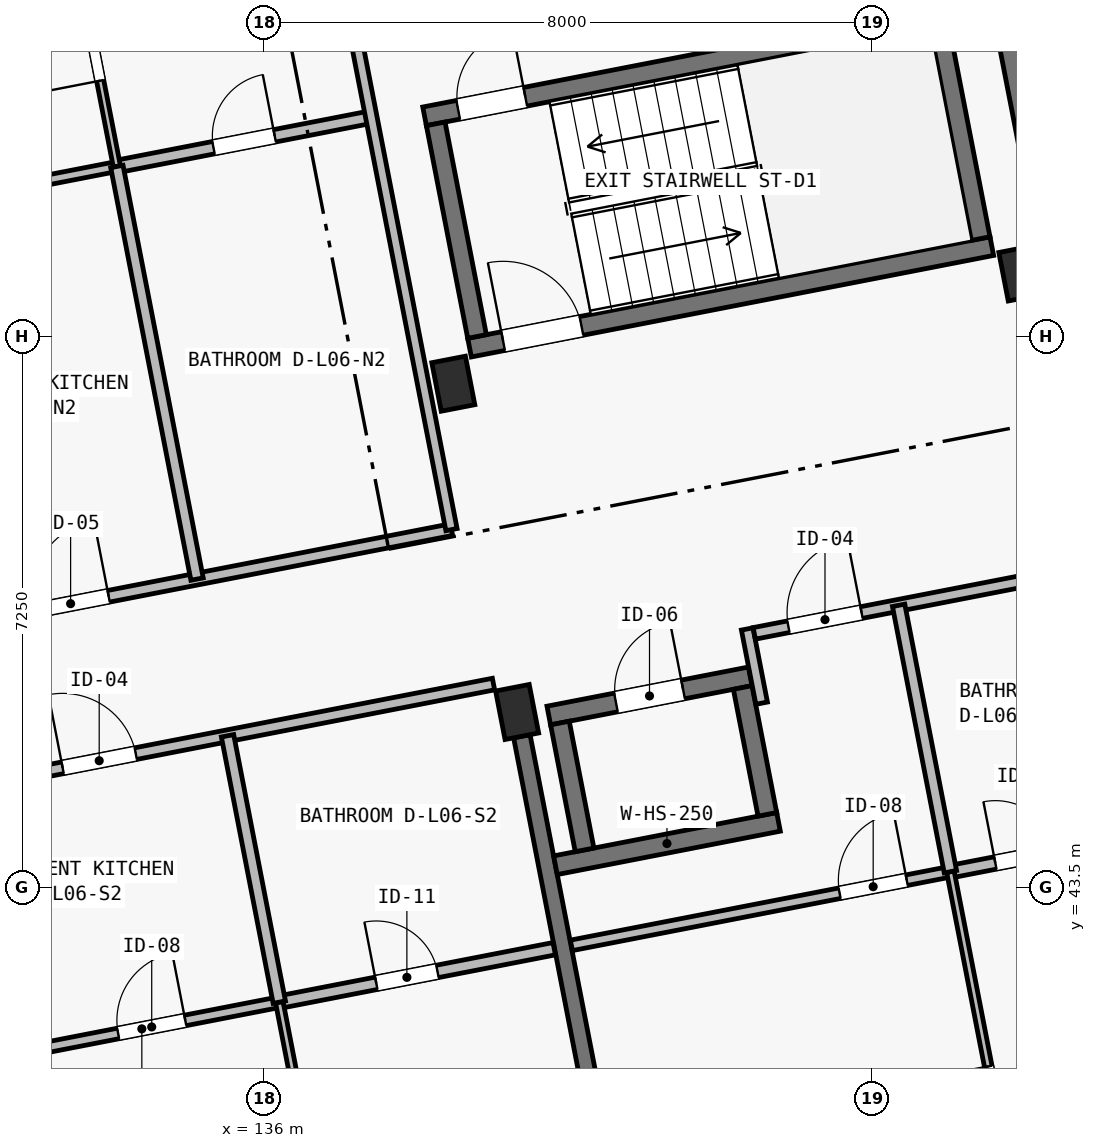
"""IFC4 building model, lengths in metres.
Left out: names, types, materials, properties, quantities, classifications, styles, units other than length and angle.
Written with IfcOpenShell. Run it as: python <this file> out.ifc"""

import sys

from ifc_helpers import new_model, si_unit, direction, frame, frame_2d, origin, origin_2d, place, context, subcontext, project, spatial, rectangle, extrude, element, fill, save


model = new_model("IFC4")
c1 = context("Model", 3, precision=1e-05, world=origin(), true_north=direction((0.0, 1.0)))
c2 = subcontext(c1, "Body", "Model", "MODEL_VIEW")
j1 = project(units=[si_unit("LENGTHUNIT", "METRE"), si_unit("PLANEANGLEUNIT", "RADIAN")], contexts=[c1])
p1 = place(None, origin())
s1 = spatial("IfcSite", under=j1, at=p1, CompositionType="ELEMENT")
p2 = place(p1, origin())
s2 = spatial("IfcBuilding", under=s1, at=p2, CompositionType="ELEMENT")
p3 = place(p2, frame((0.0, 0.0, 21.4)))
s3 = spatial("IfcBuildingStorey", under=s2, at=p3, CompositionType="ELEMENT", Elevation=21.4)
for number, where, z_axis, x_axis in (
    (1, (139.331, 45.811, 0.0), (0.0, 0.0, 1.0), (0.982, 0.191, 0.0)),
    (2, (138.491, 50.13, 0.0), (0.0, 0.0, 1.0), (0.982, 0.191, 0.0)),
    (3, (145.952, 51.58, 0.0), (0.0, 0.0, 1.0), (0.982, 0.191, 0.0)),
):
    element("IfcColumn", number, at=place(p3, frame(where, z_axis=z_axis, x_axis=x_axis)), inside=s3, PredefinedType="COLUMN", context=c2, shape_type="SweptSolid", body=[
        extrude(rectangle(XDim=0.45, YDim=0.65, at=origin_2d()), origin(), (0.0, 0.0, 1.0), 3.25),
    ])
p4 = place(p3, frame((133.259, 37.219, 0.0), z_axis=(0.0, 0.0, 1.0), x_axis=(-0.19081042584, 0.981626905393, 0.0)))
e4 = element("IfcWall", 4, at=p4, inside=s3, PredefinedType="SHEAR", context=c2, shape_type="SweptSolid", body=[
    extrude(rectangle(XDim=6.95, YDim=0.22, at=frame_2d((3.475, 0.0))), origin(), (0.0, 0.0, 1.0), 2.5),
])
p5 = place(p3, frame((140.719, 38.669, 0.0), z_axis=(0.0, 0.0, 1.0), x_axis=(-0.190783155939, 0.981632205773, 0.0)))
e5 = element("IfcWall", 5, at=p5, inside=s3, PredefinedType="SHEAR", context=c2, shape_type="SweptSolid", body=[
    extrude(rectangle(XDim=6.95, YDim=0.22, at=frame_2d((3.475, 0.0))), origin(), (0.0, 0.0, 1.0), 2.5),
])
p6 = place(p3, frame((138.113, 53.647, 0.0), z_axis=(0.0, 0.0, 1.0), x_axis=(0.981626097708, 0.19081458094, 0.0)))
e6 = element("IfcWall", 6, at=p6, inside=s3, PredefinedType="SHEAR", context=c2, shape_type="SweptSolid", body=[
    extrude(rectangle(XDim=7.0, YDim=0.25, at=frame_2d((3.5, 0.0))), origin(), (0.0, 0.0, 1.0), 3.25),
])
p7 = place(p6, frame((0.45, 0.0, 0.0)))
e7 = element("IfcOpeningElement", 7, at=p7, cuts=e6, PredefinedType="OPENING", context=c2, shape_type="SweptSolid", body=[
    extrude(rectangle(XDim=0.9, YDim=2.1, at=frame_2d((0.45, 1.05))), frame((0.0, 0.14, 0.0), z_axis=(0.0, -1.0, 0.0), x_axis=(1.0, 0.0, 0.0)), (0.0, 0.0, 1.0), 0.28),
])
p8 = place(p3, frame((138.705, 50.604, 0.0), z_axis=(0.0, 0.0, 1.0), x_axis=(0.981626097708, 0.19081458094, 0.0)))
e8 = element("IfcWall", 8, at=p8, inside=s3, PredefinedType="SHEAR", context=c2, shape_type="SweptSolid", body=[
    extrude(rectangle(XDim=7.0, YDim=0.25, at=frame_2d((3.5, 0.0))), origin(), (0.0, 0.0, 1.0), 3.25),
])
p9 = place(p8, frame((0.45, 0.0, 0.0)))
e9 = element("IfcOpeningElement", 9, at=p9, cuts=e8, PredefinedType="OPENING", context=c2, shape_type="SweptSolid", body=[
    extrude(rectangle(XDim=1.05, YDim=2.15, at=frame_2d((0.525, 1.075))), frame((0.0, 0.14, 0.0), z_axis=(0.0, -1.0, 0.0), x_axis=(1.0, 0.0, 0.0)), (0.0, 0.0, 1.0), 0.28),
])
p10 = place(p3, frame((138.804, 50.751, 0.0), z_axis=(0.0, 0.0, 1.0), x_axis=(-0.190858194834, 0.981617618762, 0.0)))
e10 = element("IfcWall", 10, at=p10, inside=s3, PredefinedType="SHEAR", context=c2, shape_type="SweptSolid", body=[
    extrude(rectangle(XDim=2.85, YDim=0.25, at=frame_2d((1.425, 0.0))), origin(), (0.0, 0.0, 1.0), 3.25),
])
p11 = place(p3, frame((145.43, 52.039, 0.0), z_axis=(0.0, 0.0, 1.0), x_axis=(-0.190842147128, 0.981620738819, 0.0)))
e11 = element("IfcWall", 11, at=p11, inside=s3, PredefinedType="SHEAR", context=c2, shape_type="SweptSolid", body=[
    extrude(rectangle(XDim=2.85, YDim=0.25, at=frame_2d((1.425, 0.0))), origin(), (0.0, 0.0, 1.0), 3.25),
])
p12 = place(p3, frame((146.264, 52.201, 0.0), z_axis=(0.0, 0.0, 1.0), x_axis=(-0.190775649797, 0.981633664584, 0.0)))
e12 = element("IfcWall", 12, at=p12, inside=s3, PredefinedType="SHEAR", context=c2, shape_type="SweptSolid", body=[
    extrude(rectangle(XDim=2.85, YDim=0.25, at=frame_2d((1.425, 0.0))), origin(), (0.0, 0.0, 1.0), 3.25),
])
p13 = place(p3, frame((139.835, 43.795, 0.0), z_axis=(0.0, 0.0, 1.0), x_axis=(0.981624737535, 0.190821578075, 0.0)))
e13 = element("IfcWall", 13, at=p13, inside=s3, PredefinedType="SHEAR", context=c2, shape_type="SweptSolid", body=[
    extrude(rectangle(XDim=2.99, YDim=0.25, at=frame_2d((1.495, 0.0))), origin(), (0.0, 0.0, 1.0), 3.25),
])
p14 = place(p3, frame((139.748, 45.764, 0.0), z_axis=(0.0, 0.0, 1.0), x_axis=(0.981630445883, 0.190792210834, 0.0)))
e14 = element("IfcWall", 14, at=p14, inside=s3, PredefinedType="SHEAR", context=c2, shape_type="SweptSolid", body=[
    extrude(rectangle(XDim=2.7, YDim=0.25, at=frame_2d((1.35, 0.0))), origin(), (0.0, 0.0, 1.0), 3.25),
])
p15 = place(p14, frame((0.9, 0.0, 0.0)))
e15 = element("IfcOpeningElement", 15, at=p15, cuts=e14, PredefinedType="OPENING", context=c2, shape_type="SweptSolid", body=[
    extrude(rectangle(XDim=0.9, YDim=2.05, at=frame_2d((0.45, 1.025))), frame((0.0, 0.14, 0.0), z_axis=(0.0, -1.0, 0.0), x_axis=(1.0, 0.0, 0.0)), (0.0, 0.0, 1.0), 0.28),
])
for number, where, z_axis, x_axis in (
    (16, (140.218, 43.997, 0.0), (0.0, 0.0, 1.0), (-0.191, 0.982, 0.0)),
    (17, (142.623, 44.464, 0.0), (0.0, 0.0, 1.0), (-0.191, 0.982, 0.0)),
):
    element("IfcWall", number, at=place(p3, frame(where, z_axis=z_axis, x_axis=x_axis)), inside=s3, PredefinedType="SHEAR", context=c2, shape_type="SweptSolid", body=[
        extrude(rectangle(XDim=1.7, YDim=0.25, at=frame_2d((0.85, 0.0))), origin(), (0.0, 0.0, 1.0), 3.25),
    ])
p16 = place(p3, frame((132.021, 44.818, 0.0), z_axis=(0.0, 0.0, 1.0), x_axis=(0.981629109582, 0.190799086008, 0.0)))
e18 = element("IfcWall", 18, at=p16, inside=s3, PredefinedType="PARTITIONING", context=c2, shape_type="SweptSolid", body=[
    extrude(rectangle(XDim=7.13, YDim=0.155, at=frame_2d((3.565, 0.0))), origin(), (0.0, 0.0, 1.0), 2.97),
])
p17 = place(p16, frame((1.355, 0.0, 0.0)))
e19 = element("IfcOpeningElement", 19, at=p17, cuts=e18, PredefinedType="OPENING", context=c2, shape_type="SweptSolid", body=[
    extrude(rectangle(XDim=0.98, YDim=2.15, at=frame_2d((0.49, 1.075))), frame((0.0, 0.093, 0.0), z_axis=(0.0, -1.0, 0.0), x_axis=(1.0, 0.0, 0.0)), (0.0, 0.0, 1.0), 0.185),
])
p18 = place(p3, frame((132.584, 41.291, 0.0), z_axis=(0.0, 0.0, 1.0), x_axis=(0.981628834294, 0.190800502313, 0.0)))
e20 = element("IfcWall", 20, at=p18, inside=s3, PredefinedType="PARTITIONING", context=c2, shape_type="SweptSolid", body=[
    extrude(rectangle(XDim=3.685, YDim=0.14, at=frame_2d((1.843, 0.0))), origin(), (0.0, 0.0, 1.0), 2.97),
])
p19 = place(p18, frame((1.525, 0.0, 0.0)))
e21 = element("IfcOpeningElement", 21, at=p19, cuts=e20, PredefinedType="OPENING", context=c2, shape_type="SweptSolid", body=[
    extrude(rectangle(XDim=0.9, YDim=2.1, at=frame_2d((0.45, 1.05))), frame((0.0, 0.085, 0.0), z_axis=(0.0, -1.0, 0.0), x_axis=(1.0, 0.0, 0.0)), (0.0, 0.0, 1.0), 0.17),
])
p20 = place(p3, frame((136.202, 41.994, 0.0), z_axis=(0.0, 0.0, 1.0), x_axis=(0.981626422232, 0.190812911449, 0.0)))
e22 = element("IfcWall", 22, at=p20, inside=s3, PredefinedType="PLUMBINGWALL", context=c2, shape_type="SweptSolid", body=[
    extrude(rectangle(XDim=3.685, YDim=0.165, at=frame_2d((1.842, 0.0))), origin(), (0.0, 0.0, 1.0), 2.97),
])
p21 = place(p20, frame((1.3, 0.0, 0.0)))
e23 = element("IfcOpeningElement", 23, at=p21, cuts=e22, PredefinedType="OPENING", context=c2, shape_type="SweptSolid", body=[
    extrude(rectangle(XDim=0.82, YDim=2.08, at=frame_2d((0.41, 1.04))), frame((0.0, 0.097, 0.0), z_axis=(0.0, -1.0, 0.0), x_axis=(1.0, 0.0, 0.0)), (0.0, 0.0, 1.0), 0.195),
])
p22 = place(p3, frame((137.125, 37.242, 0.0), z_axis=(0.0, 0.0, 1.0), x_axis=(-0.190768400775, 0.981635073368, 0.0)))
e24 = element("IfcWall", 24, at=p22, inside=s3, PredefinedType="PARTITIONING", context=c2, shape_type="SweptSolid", body=[
    extrude(rectangle(XDim=4.84, YDim=0.1, at=frame_2d((2.42, 0.0))), origin(), (0.0, 0.0, 1.0), 2.97),
])
p23 = place(p22, frame((1.35, 0.0, 0.0)))
e25 = element("IfcOpeningElement", 25, at=p23, cuts=e24, PredefinedType="OPENING", context=c2, shape_type="SweptSolid", body=[
    extrude(rectangle(XDim=0.88, YDim=2.1, at=frame_2d((0.44, 1.05))), frame((0.0, 0.065, 0.0), z_axis=(0.0, -1.0, 0.0), x_axis=(1.0, 0.0, 0.0)), (0.0, 0.0, 1.0), 0.13),
])
p24 = place(p3, frame((136.202, 41.994, 0.0), z_axis=(0.0, 0.0, 1.0), x_axis=(-0.190865998276, 0.981616101489, 0.0)))
e26 = element("IfcWall", 26, at=p24, inside=s3, PredefinedType="PLUMBINGWALL", context=c2, shape_type="SweptSolid", body=[
    extrude(rectangle(XDim=3.57, YDim=0.165, at=frame_2d((1.785, 0.0))), origin(), (0.0, 0.0, 1.0), 2.97),
])
p25 = place(p3, frame((142.548, 45.927, 0.0), z_axis=(0.0, 0.0, 1.0), x_axis=(-0.190639805817, 0.981660055436, 0.0)))
e27 = element("IfcWall", 27, at=p25, inside=s3, PredefinedType="PARTITIONING", context=c2, shape_type="SweptSolid", body=[
    extrude(rectangle(XDim=0.995, YDim=0.155, at=frame_2d((0.498, 0.0))), origin(), (0.0, 0.0, 1.0), 2.97),
])
p26 = place(p3, frame((142.451, 46.845, 0.0), z_axis=(0.0, 0.0, 1.0), x_axis=(0.981629934904, 0.190794839817, 0.0)))
e28 = element("IfcWall", 28, at=p26, inside=s3, PredefinedType="PARTITIONING", context=c2, shape_type="SweptSolid", body=[
    extrude(rectangle(XDim=4.105, YDim=0.155, at=frame_2d((2.052, 0.0))), origin(), (0.0, 0.0, 1.0), 2.97),
])
p27 = place(p26, frame((0.458, 0.0, 0.0)))
e29 = element("IfcOpeningElement", 29, at=p27, cuts=e28, PredefinedType="OPENING", context=c2, shape_type="SweptSolid", body=[
    extrude(rectangle(XDim=0.98, YDim=2.15, at=frame_2d((0.49, 1.075))), frame((0.0, 0.093, 0.0), z_axis=(0.0, -1.0, 0.0), x_axis=(1.0, 0.0, 0.0)), (0.0, 0.0, 1.0), 0.185),
])
p28 = place(p3, frame((140.045, 42.741, 0.0), z_axis=(0.0, 0.0, 1.0), x_axis=(0.981629144122, 0.190798908307, 0.0)))
e30 = element("IfcWall", 30, at=p28, inside=s3, PredefinedType="PARTITIONING", context=c2, shape_type="SweptSolid", body=[
    extrude(rectangle(XDim=5.08, YDim=0.14, at=frame_2d((2.54, 0.0))), origin(), (0.0, 0.0, 1.0), 2.97),
])
p29 = place(p28, frame((3.595, 0.0, 0.0)))
e31 = element("IfcOpeningElement", 31, at=p29, cuts=e30, PredefinedType="OPENING", context=c2, shape_type="SweptSolid", body=[
    extrude(rectangle(XDim=0.9, YDim=2.1, at=frame_2d((0.45, 1.05))), frame((0.0, 0.085, 0.0), z_axis=(0.0, -1.0, 0.0), x_axis=(1.0, 0.0, 0.0)), (0.0, 0.0, 1.0), 0.17),
])
p30 = place(p3, frame((145.031, 43.71, 0.0), z_axis=(0.0, 0.0, 1.0), x_axis=(0.981624265801, 0.190824004755, 0.0)))
e32 = element("IfcWall", 32, at=p30, inside=s3, PredefinedType="PLUMBINGWALL", context=c2, shape_type="SweptSolid", body=[
    extrude(rectangle(XDim=2.29, YDim=0.165, at=frame_2d((1.145, 0.0))), origin(), (0.0, 0.0, 1.0), 2.97),
])
p31 = place(p30, frame((0.602, 0.0, 0.0)))
e33 = element("IfcOpeningElement", 33, at=p31, cuts=e32, PredefinedType="OPENING", context=c2, shape_type="SweptSolid", body=[
    extrude(rectangle(XDim=0.82, YDim=2.08, at=frame_2d((0.41, 1.04))), frame((0.0, 0.097, 0.0), z_axis=(0.0, -1.0, 0.0), x_axis=(1.0, 0.0, 0.0)), (0.0, 0.0, 1.0), 0.195),
])
p32 = place(p3, frame((145.955, 38.959, 0.0), z_axis=(0.0, 0.0, 1.0), x_axis=(-0.190826454074, 0.98162378966, 0.0)))
e34 = element("IfcWall", 34, at=p32, inside=s3, PredefinedType="PARTITIONING", context=c2, shape_type="SweptSolid", body=[
    extrude(rectangle(XDim=4.84, YDim=0.1, at=frame_2d((2.42, 0.0))), origin(), (0.0, 0.0, 1.0), 2.97),
])
p33 = place(p32, frame((1.35, 0.0, 0.0)))
e35 = element("IfcOpeningElement", 35, at=p33, cuts=e34, PredefinedType="OPENING", context=c2, shape_type="SweptSolid", body=[
    extrude(rectangle(XDim=0.88, YDim=2.1, at=frame_2d((0.44, 1.05))), frame((0.0, 0.065, 0.0), z_axis=(0.0, -1.0, 0.0), x_axis=(1.0, 0.0, 0.0)), (0.0, 0.0, 1.0), 0.13),
])
p34 = place(p3, frame((145.031, 43.71, 0.0), z_axis=(0.0, 0.0, 1.0), x_axis=(-0.190800102044, 0.981628912095, 0.0)))
e36 = element("IfcWall", 36, at=p34, inside=s3, PredefinedType="PLUMBINGWALL", context=c2, shape_type="SweptSolid", body=[
    extrude(rectangle(XDim=3.57, YDim=0.165, at=frame_2d((1.785, 0.0))), origin(), (0.0, 0.0, 1.0), 2.97),
])
p35 = place(p3, frame((131.772, 46.909, 0.0), z_axis=(0.0, 0.0, 1.0), x_axis=(0.981622468528, 0.190833249935, 0.0)))
e37 = element("IfcWall", 37, at=p35, inside=s3, PredefinedType="PARTITIONING", context=c2, shape_type="SweptSolid", body=[
    extrude(rectangle(XDim=6.82, YDim=0.155, at=frame_2d((3.41, 0.0))), origin(), (0.0, 0.0, 1.0), 2.97),
])
p36 = place(p35, frame((1.205, 0.0, 0.0)))
e38 = element("IfcOpeningElement", 38, at=p36, cuts=e37, PredefinedType="OPENING", context=c2, shape_type="SweptSolid", body=[
    extrude(rectangle(XDim=1.02, YDim=2.2, at=frame_2d((0.51, 1.1))), frame((0.0, 0.093, 0.0), z_axis=(0.0, -1.0, 0.0), x_axis=(1.0, 0.0, 0.0)), (0.0, 0.0, 1.0), 0.185),
])
p37 = place(p3, frame((130.717, 52.337, 0.0), z_axis=(0.0, 0.0, 1.0), x_axis=(0.981629173664, 0.190798756314, 0.0)))
e39 = element("IfcWall", 39, at=p37, inside=s3, PredefinedType="PARTITIONING", context=c2, shape_type="SweptSolid", body=[
    extrude(rectangle(XDim=3.41, YDim=0.13, at=frame_2d((1.705, 0.0))), origin(), (0.0, 0.0, 1.0), 2.97),
])
p38 = place(p37, frame((1.255, 0.0, 0.0)))
e40 = element("IfcOpeningElement", 40, at=p38, cuts=e39, PredefinedType="OPENING", context=c2, shape_type="SweptSolid", body=[
    extrude(rectangle(XDim=0.88, YDim=2.1, at=frame_2d((0.44, 1.05))), frame((0.0, 0.08, 0.0), z_axis=(0.0, -1.0, 0.0), x_axis=(1.0, 0.0, 0.0)), (0.0, 0.0, 1.0), 0.16),
])
p39 = place(p3, frame((134.065, 52.988, 0.0), z_axis=(0.0, 0.0, 1.0), x_axis=(0.981629173664, 0.190798756314, 0.0)))
e41 = element("IfcWall", 41, at=p39, inside=s3, PredefinedType="PLUMBINGWALL", context=c2, shape_type="SweptSolid", body=[
    extrude(rectangle(XDim=3.41, YDim=0.165, at=frame_2d((1.705, 0.0))), origin(), (0.0, 0.0, 1.0), 2.97),
])
p40 = place(p39, frame((1.295, 0.0, 0.0)))
e42 = element("IfcOpeningElement", 42, at=p40, cuts=e41, PredefinedType="OPENING", context=c2, shape_type="SweptSolid", body=[
    extrude(rectangle(XDim=0.82, YDim=2.08, at=frame_2d((0.41, 1.04))), frame((0.0, 0.097, 0.0), z_axis=(0.0, -1.0, 0.0), x_axis=(1.0, 0.0, 0.0)), (0.0, 0.0, 1.0), 0.195),
])
p41 = place(p3, frame((134.065, 52.988, 0.0), z_axis=(0.0, 0.0, 1.0), x_axis=(-0.190812443151, 0.981626513262, 0.0)))
e43 = element("IfcWall", 43, at=p41, inside=s3, PredefinedType="PARTITIONING", context=c2, shape_type="SweptSolid", body=[
    extrude(rectangle(XDim=4.34, YDim=0.095, at=frame_2d((2.17, 0.0))), origin(), (0.0, 0.0, 1.0), 2.97),
])
p42 = place(p41, frame((1.15, 0.0, 0.0)))
e44 = element("IfcOpeningElement", 44, at=p42, cuts=e43, PredefinedType="OPENING", context=c2, shape_type="SweptSolid", body=[
    extrude(rectangle(XDim=0.9, YDim=2.1, at=frame_2d((0.45, 1.05))), frame((0.0, 0.062, 0.0), z_axis=(0.0, -1.0, 0.0), x_axis=(1.0, 0.0, 0.0)), (0.0, 0.0, 1.0), 0.125),
])
p43 = place(p3, frame((135.12, 47.559, 0.0), z_axis=(0.0, 0.0, 1.0), x_axis=(-0.190807031124, 0.981627565258, 0.0)))
e45 = element("IfcWall", 45, at=p43, inside=s3, PredefinedType="PLUMBINGWALL", context=c2, shape_type="SweptSolid", body=[
    extrude(rectangle(XDim=5.53, YDim=0.165, at=frame_2d((2.765, 0.0))), origin(), (0.0, 0.0, 1.0), 2.97),
])
p44 = place(p3, frame((138.467, 48.21, 0.0), z_axis=(0.0, 0.0, 1.0), x_axis=(-0.190814044018, 0.981626202078, 0.0)))
e46 = element("IfcWall", 46, at=p44, inside=s3, PredefinedType="PARTITIONING", context=c2, shape_type="SweptSolid", body=[
    extrude(rectangle(XDim=9.87, YDim=0.15, at=frame_2d((4.935, 0.0))), origin(), (0.0, 0.0, 1.0), 2.97),
])
p45 = place(p17, origin())
e47 = element("IfcDoor", 47, at=p45, inside=s3, OperationType="SINGLE_SWING_LEFT", PredefinedType="DOOR", context=c2, shape_type="SweptSolid", body=[
    extrude(rectangle(XDim=0.98, YDim=2.15, at=frame_2d((0.49, 1.075))), frame((0.0, 0.025, 0.0), z_axis=(0.0, -1.0, 0.0), x_axis=(1.0, 0.0, 0.0)), (0.0, 0.0, 1.0), 0.05),
])
fill(e19, e47)
p46 = place(p19, origin())
e48 = element("IfcDoor", 48, at=p46, inside=s3, OperationType="SINGLE_SWING_RIGHT", PredefinedType="DOOR", context=c2, shape_type="SweptSolid", body=[
    extrude(rectangle(XDim=0.9, YDim=2.1, at=frame_2d((0.45, 1.05))), frame((0.0, 0.025, 0.0), z_axis=(0.0, -1.0, 0.0), x_axis=(1.0, 0.0, 0.0)), (0.0, 0.0, 1.0), 0.05),
])
fill(e21, e48)
p47 = place(p21, origin())
e49 = element("IfcDoor", 49, at=p47, inside=s3, OperationType="SINGLE_SWING_LEFT", PredefinedType="DOOR", context=c2, shape_type="SweptSolid", body=[
    extrude(rectangle(XDim=0.82, YDim=2.08, at=frame_2d((0.41, 1.04))), frame((0.0, 0.025, 0.0), z_axis=(0.0, -1.0, 0.0), x_axis=(1.0, 0.0, 0.0)), (0.0, 0.0, 1.0), 0.05),
])
fill(e23, e49)
p48 = place(p27, origin())
e50 = element("IfcDoor", 50, at=p48, inside=s3, OperationType="SINGLE_SWING_RIGHT", PredefinedType="DOOR", context=c2, shape_type="SweptSolid", body=[
    extrude(rectangle(XDim=0.98, YDim=2.15, at=frame_2d((0.49, 1.075))), frame((0.0, 0.025, 0.0), z_axis=(0.0, -1.0, 0.0), x_axis=(1.0, 0.0, 0.0)), (0.0, 0.0, 1.0), 0.05),
])
fill(e29, e50)
p49 = place(p29, origin())
e51 = element("IfcDoor", 51, at=p49, inside=s3, OperationType="SINGLE_SWING_RIGHT", PredefinedType="DOOR", context=c2, shape_type="SweptSolid", body=[
    extrude(rectangle(XDim=0.9, YDim=2.1, at=frame_2d((0.45, 1.05))), frame((0.0, 0.025, 0.0), z_axis=(0.0, -1.0, 0.0), x_axis=(1.0, 0.0, 0.0)), (0.0, 0.0, 1.0), 0.05),
])
fill(e31, e51)
p50 = place(p31, origin())
e52 = element("IfcDoor", 52, at=p50, inside=s3, OperationType="SINGLE_SWING_LEFT", PredefinedType="DOOR", context=c2, shape_type="SweptSolid", body=[
    extrude(rectangle(XDim=0.82, YDim=2.08, at=frame_2d((0.41, 1.04))), frame((0.0, 0.025, 0.0), z_axis=(0.0, -1.0, 0.0), x_axis=(1.0, 0.0, 0.0)), (0.0, 0.0, 1.0), 0.05),
])
fill(e33, e52)
p51 = place(p33, origin())
e53 = element("IfcDoor", 53, at=p51, inside=s3, OperationType="SINGLE_SWING_RIGHT", PredefinedType="DOOR", context=c2, shape_type="SweptSolid", body=[
    extrude(rectangle(XDim=0.88, YDim=2.1, at=frame_2d((0.44, 1.05))), frame((0.0, 0.025, 0.0), z_axis=(0.0, -1.0, 0.0), x_axis=(1.0, 0.0, 0.0)), (0.0, 0.0, 1.0), 0.05),
])
fill(e35, e53)
p52 = place(p36, origin())
e54 = element("IfcDoor", 54, at=p52, inside=s3, OperationType="SINGLE_SWING_RIGHT", PredefinedType="DOOR", context=c2, shape_type="SweptSolid", body=[
    extrude(rectangle(XDim=1.02, YDim=2.2, at=frame_2d((0.51, 1.1))), frame((0.0, 0.025, 0.0), z_axis=(0.0, -1.0, 0.0), x_axis=(1.0, 0.0, 0.0)), (0.0, 0.0, 1.0), 0.05),
])
fill(e38, e54)
p53 = place(p40, origin())
e55 = element("IfcDoor", 55, at=p53, inside=s3, OperationType="SINGLE_SWING_RIGHT", PredefinedType="DOOR", context=c2, shape_type="SweptSolid", body=[
    extrude(rectangle(XDim=0.82, YDim=2.08, at=frame_2d((0.41, 1.04))), frame((0.0, 0.025, 0.0), z_axis=(0.0, -1.0, 0.0), x_axis=(1.0, 0.0, 0.0)), (0.0, 0.0, 1.0), 0.05),
])
fill(e42, e55)
p54 = place(p42, origin())
e56 = element("IfcDoor", 56, at=p54, inside=s3, OperationType="SINGLE_SWING_LEFT", PredefinedType="DOOR", context=c2, shape_type="SweptSolid", body=[
    extrude(rectangle(XDim=0.9, YDim=2.1, at=frame_2d((0.45, 1.05))), frame((0.0, 0.025, 0.0), z_axis=(0.0, -1.0, 0.0), x_axis=(1.0, 0.0, 0.0)), (0.0, 0.0, 1.0), 0.05),
])
fill(e44, e56)
p55 = place(p9, origin())
e57 = element("IfcDoor", 57, at=p55, inside=s3, OperationType="SINGLE_SWING_LEFT", PredefinedType="DOOR", context=c2, shape_type="SweptSolid", body=[
    extrude(rectangle(XDim=1.05, YDim=2.15, at=frame_2d((0.525, 1.075))), frame((0.0, 0.025, 0.0), z_axis=(0.0, -1.0, 0.0), x_axis=(1.0, 0.0, 0.0)), (0.0, 0.0, 1.0), 0.05),
])
fill(e9, e57)
p56 = place(p7, origin())
e58 = element("IfcDoor", 58, at=p56, inside=s3, OperationType="SINGLE_SWING_RIGHT", PredefinedType="DOOR", context=c2, shape_type="SweptSolid", body=[
    extrude(rectangle(XDim=0.9, YDim=2.1, at=frame_2d((0.45, 1.05))), frame((0.0, 0.025, 0.0), z_axis=(0.0, -1.0, 0.0), x_axis=(1.0, 0.0, 0.0)), (0.0, 0.0, 1.0), 0.05),
])
fill(e7, e58)
p57 = place(p15, origin())
e59 = element("IfcDoor", 59, at=p57, inside=s3, OperationType="SINGLE_SWING_RIGHT", PredefinedType="DOOR", context=c2, shape_type="SweptSolid", body=[
    extrude(rectangle(XDim=0.9, YDim=2.05, at=frame_2d((0.45, 1.025))), frame((0.0, 0.025, 0.0), z_axis=(0.0, -1.0, 0.0), x_axis=(1.0, 0.0, 0.0)), (0.0, 0.0, 1.0), 0.05),
])
fill(e15, e59)
save(model, sys.argv[1])
